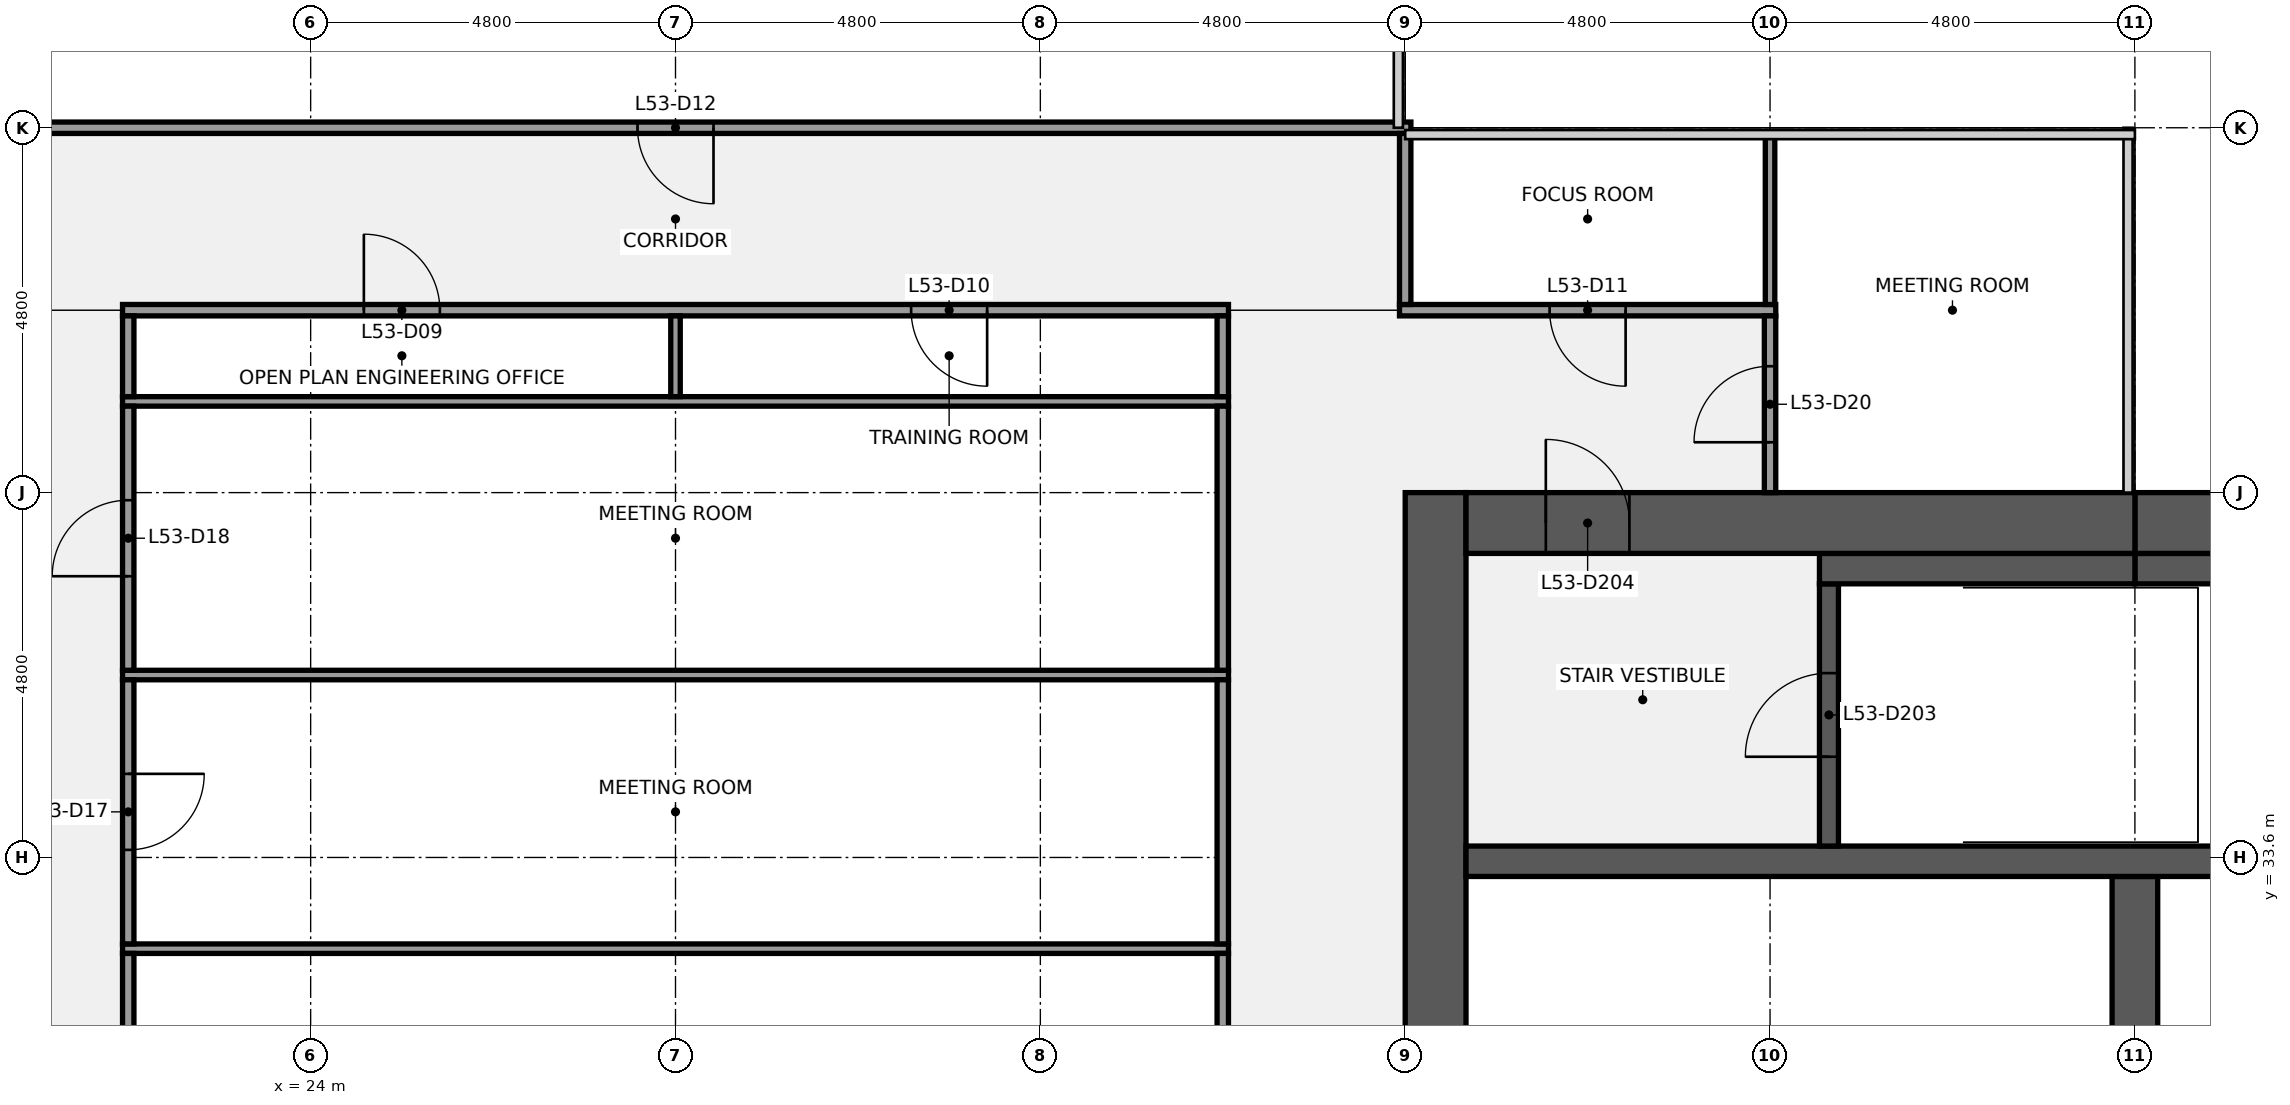
"""IFC4 building model, lengths in metres.
Left out: names, types, materials, properties, quantities, classifications, styles, units other than length and angle.
Written with IfcOpenShell. Run it as: python <this file> out.ifc"""

import sys

from ifc_helpers import new_model, si_unit, direction, frame, frame_2d, origin, place, context, subcontext, project, spatial, rectangle, extrude, element, fill, save


model = new_model("IFC4")
c1 = context("Model", 3, precision=1e-05, world=origin(), true_north=direction((0.0, 1.0)))
c2 = subcontext(c1, "Body", "Model", "MODEL_VIEW")
j1 = project(units=[si_unit("LENGTHUNIT", "METRE"), si_unit("PLANEANGLEUNIT", "RADIAN")], contexts=[c1])
p1 = place(None, origin())
s1 = spatial("IfcSite", under=j1, at=p1, CompositionType="ELEMENT")
p2 = place(p1, origin())
s2 = spatial("IfcBuilding", under=s1, at=p2, CompositionType="ELEMENT")
p3 = place(p2, frame((0.0, 0.0, 241.2)))
s3 = spatial("IfcBuildingStorey", under=s2, at=p3, CompositionType="ELEMENT", Elevation=241.2)
p4 = place(p3, frame((38.8, 9.6, 0.0), z_axis=(0.0, 0.0, 1.0), x_axis=(0.0, 1.0, 0.0)))
e1 = element("IfcWall", 1, at=p4, inside=s3, PredefinedType="SHEAR", context=c2, shape_type="SweptSolid", body=[
    extrude(rectangle(XDim=28.8, YDim=0.8, at=frame_2d((14.4, 0.0))), origin(), (0.0, 0.0, 1.0), 3.84),
])
p5 = place(p4, frame((8.7, 0.0, 0.0)))
e2 = element("IfcOpeningElement", 2, at=p5, cuts=e1, PredefinedType="OPENING", context=c2, shape_type="SweptSolid", body=[
    extrude(rectangle(XDim=1.8, YDim=2.1, at=frame_2d((0.9, 1.05))), frame((0.0, 0.41, 0.0), z_axis=(0.0, -1.0, 0.0), x_axis=(1.0, 0.0, 0.0)), (0.0, 0.0, 1.0), 0.82),
])
p6 = place(p4, frame((18.3, 0.0, 0.0)))
e3 = element("IfcOpeningElement", 3, at=p6, cuts=e1, PredefinedType="OPENING", context=c2, shape_type="SweptSolid", body=[
    extrude(rectangle(XDim=1.8, YDim=2.1, at=frame_2d((0.9, 1.05))), frame((0.0, 0.41, 0.0), z_axis=(0.0, -1.0, 0.0), x_axis=(1.0, 0.0, 0.0)), (0.0, 0.0, 1.0), 0.82),
])
p7 = place(p3, frame((48.0, 30.75, 0.0), z_axis=(0.0, 0.0, 1.0), x_axis=(0.0, 1.0, 0.0)))
e4 = element("IfcWall", 4, at=p7, inside=s3, PredefinedType="SHEAR", context=c2, shape_type="SweptSolid", body=[
    extrude(rectangle(XDim=2.6, YDim=0.6, at=frame_2d((1.3, 0.0))), origin(), (0.0, 0.0, 1.0), 3.84),
])
p8 = place(p3, frame((39.2, 33.55, 0.0), z_axis=(0.0, 0.0, 1.0), x_axis=(1.0, 0.0, 0.0)))
e5 = element("IfcWall", 5, at=p8, inside=s3, PredefinedType="SHEAR", context=c2, shape_type="SweptSolid", body=[
    extrude(rectangle(XDim=17.6, YDim=0.4, at=frame_2d((8.8, 0.0))), origin(), (0.0, 0.0, 1.0), 3.84),
])
p9 = place(p3, frame((43.975, 33.75, 0.0), z_axis=(0.0, 0.0, 1.0), x_axis=(0.0, 1.0, 0.0)))
e6 = element("IfcWall", 6, at=p9, inside=s3, PredefinedType="SHEAR", context=c2, shape_type="SweptSolid", body=[
    extrude(rectangle(XDim=3.45, YDim=0.25, at=frame_2d((1.725, 0.0))), origin(), (0.0, 0.0, 1.0), 3.84),
])
p10 = place(p9, frame((1.175, 0.0, 0.0)))
e7 = element("IfcOpeningElement", 7, at=p10, cuts=e6, PredefinedType="OPENING", context=c2, shape_type="SweptSolid", body=[
    extrude(rectangle(XDim=1.1, YDim=2.1, at=frame_2d((0.55, 1.05))), frame((0.0, 0.135, 0.0), z_axis=(0.0, -1.0, 0.0), x_axis=(1.0, 0.0, 0.0)), (0.0, 0.0, 1.0), 0.27),
])
p11 = place(p3, frame((48.0, 37.4, 0.0), z_axis=(0.0, 0.0, 1.0), x_axis=(1.0, 0.0, 0.0)))
e8 = element("IfcWall", 8, at=p11, inside=s3, PredefinedType="SHEAR", context=c2, shape_type="SweptSolid", body=[
    extrude(rectangle(XDim=3.35, YDim=0.4, at=frame_2d((1.675, 0.0))), origin(), (0.0, 0.0, 1.0), 3.84),
])
p12 = place(p3, frame((43.85, 37.4, 0.0), z_axis=(0.0, 0.0, 1.0), x_axis=(1.0, 0.0, 0.0)))
e9 = element("IfcWall", 9, at=p12, inside=s3, PredefinedType="SHEAR", context=c2, shape_type="SweptSolid", body=[
    extrude(rectangle(XDim=4.15, YDim=0.4, at=frame_2d((2.075, 0.0))), origin(), (0.0, 0.0, 1.0), 3.84),
])
p13 = place(p3, frame((48.0, 38.0, 0.0), z_axis=(0.0, 0.0, 1.0), x_axis=(1.0, 0.0, 0.0)))
e10 = element("IfcWall", 10, at=p13, inside=s3, PredefinedType="SHEAR", context=c2, shape_type="SweptSolid", body=[
    extrude(rectangle(XDim=8.8, YDim=0.8, at=frame_2d((4.4, 0.0))), origin(), (0.0, 0.0, 1.0), 3.84),
])
p14 = place(p13, frame((1.5, 0.0, 0.9)))
e11 = element("IfcOpeningElement", 11, at=p14, cuts=e10, PredefinedType="OPENING", context=c2, shape_type="SweptSolid", body=[
    extrude(rectangle(XDim=1.8, YDim=1.5, at=frame_2d((0.9, 0.75))), frame((0.0, 0.41, 0.0), z_axis=(0.0, -1.0, 0.0), x_axis=(1.0, 0.0, 0.0)), (0.0, 0.0, 1.0), 0.82),
])
p15 = place(p3, frame((39.2, 38.0, 0.0), z_axis=(0.0, 0.0, 1.0), x_axis=(1.0, 0.0, 0.0)))
e12 = element("IfcWall", 12, at=p15, inside=s3, PredefinedType="SHEAR", context=c2, shape_type="SweptSolid", body=[
    extrude(rectangle(XDim=8.8, YDim=0.8, at=frame_2d((4.4, 0.0))), origin(), (0.0, 0.0, 1.0), 3.84),
])
p16 = place(p15, frame((1.05, 0.0, 0.0)))
e13 = element("IfcOpeningElement", 13, at=p16, cuts=e12, PredefinedType="OPENING", context=c2, shape_type="SweptSolid", body=[
    extrude(rectangle(XDim=1.1, YDim=2.1, at=frame_2d((0.55, 1.05))), frame((0.0, 0.41, 0.0), z_axis=(0.0, -1.0, 0.0), x_axis=(1.0, 0.0, 0.0)), (0.0, 0.0, 1.0), 0.82),
])
for number, where, z_axis, x_axis in (
    (14, (21.525, 32.4, 0.0), (0.0, 0.0, 1.0), (1.0, 0.0, 0.0)),
    (15, (21.525, 36.0, 0.0), (0.0, 0.0, 1.0), (1.0, 0.0, 0.0)),
    (16, (21.525, 39.6, 0.0), (0.0, 0.0, 1.0), (1.0, 0.0, 0.0)),
):
    element("IfcWall", number, at=place(p3, frame(where, z_axis=z_axis, x_axis=x_axis)), inside=s3, PredefinedType="PARTITIONING", context=c2, shape_type="SweptSolid", body=[
        extrude(rectangle(XDim=14.55, YDim=0.125, at=frame_2d((7.275, 0.0))), origin(), (0.0, 0.0, 1.0), 2.849),
    ])
p17 = place(p3, frame((21.525, 40.8, 0.0), z_axis=(0.0, 0.0, 1.0), x_axis=(1.0, 0.0, 0.0)))
e17 = element("IfcWall", 17, at=p17, inside=s3, PredefinedType="PARTITIONING", context=c2, shape_type="SweptSolid", body=[
    extrude(rectangle(XDim=14.55, YDim=0.15, at=frame_2d((7.275, 0.0))), origin(), (0.0, 0.0, 1.0), 2.849),
])
p18 = place(p17, frame((3.175, 0.0, 0.0)))
e18 = element("IfcOpeningElement", 18, at=p18, cuts=e17, PredefinedType="OPENING", context=c2, shape_type="SweptSolid", body=[
    extrude(rectangle(XDim=1.0, YDim=2.1, at=frame_2d((0.5, 1.05))), frame((0.0, 0.085, 0.0), z_axis=(0.0, -1.0, 0.0), x_axis=(1.0, 0.0, 0.0)), (0.0, 0.0, 1.0), 0.17),
])
p19 = place(p17, frame((10.375, 0.0, 0.0)))
e19 = element("IfcOpeningElement", 19, at=p19, cuts=e17, PredefinedType="OPENING", context=c2, shape_type="SweptSolid", body=[
    extrude(rectangle(XDim=1.0, YDim=2.1, at=frame_2d((0.5, 1.05))), frame((0.0, 0.085, 0.0), z_axis=(0.0, -1.0, 0.0), x_axis=(1.0, 0.0, 0.0)), (0.0, 0.0, 1.0), 0.17),
])
p20 = place(p3, frame((38.325, 40.8, 0.0), z_axis=(0.0, 0.0, 1.0), x_axis=(1.0, 0.0, 0.0)))
e20 = element("IfcWall", 20, at=p20, inside=s3, PredefinedType="PARTITIONING", context=c2, shape_type="SweptSolid", body=[
    extrude(rectangle(XDim=4.95, YDim=0.15, at=frame_2d((2.475, 0.0))), origin(), (0.0, 0.0, 1.0), 2.849),
])
p21 = place(p20, frame((1.975, 0.0, 0.0)))
e21 = element("IfcOpeningElement", 21, at=p21, cuts=e20, PredefinedType="OPENING", context=c2, shape_type="SweptSolid", body=[
    extrude(rectangle(XDim=1.0, YDim=2.1, at=frame_2d((0.5, 1.05))), frame((0.0, 0.085, 0.0), z_axis=(0.0, -1.0, 0.0), x_axis=(1.0, 0.0, 0.0)), (0.0, 0.0, 1.0), 0.17),
])
p22 = place(p3, frame((19.125, 43.2, 0.0), z_axis=(0.0, 0.0, 1.0), x_axis=(1.0, 0.0, 0.0)))
e22 = element("IfcWall", 22, at=p22, inside=s3, PredefinedType="PARTITIONING", context=c2, shape_type="SweptSolid", body=[
    extrude(rectangle(XDim=19.35, YDim=0.15, at=frame_2d((9.675, 0.0))), origin(), (0.0, 0.0, 1.0), 2.849),
])
p23 = place(p22, frame((9.175, 0.0, 0.0)))
e23 = element("IfcOpeningElement", 23, at=p23, cuts=e22, PredefinedType="OPENING", context=c2, shape_type="SweptSolid", body=[
    extrude(rectangle(XDim=1.0, YDim=2.1, at=frame_2d((0.5, 1.05))), frame((0.0, 0.085, 0.0), z_axis=(0.0, -1.0, 0.0), x_axis=(1.0, 0.0, 0.0)), (0.0, 0.0, 1.0), 0.17),
])
p24 = place(p3, frame((21.6, 22.863, 0.0), z_axis=(0.0, 0.0, 1.0), x_axis=(0.0, 1.0, 0.0)))
e24 = element("IfcWall", 24, at=p24, inside=s3, PredefinedType="PARTITIONING", context=c2, shape_type="SweptSolid", body=[
    extrude(rectangle(XDim=9.475, YDim=0.15, at=frame_2d((4.737, 0.0))), origin(), (0.0, 0.0, 1.0), 2.849),
])
p25 = place(p24, frame((4.238, 0.0, 0.0)))
e25 = element("IfcOpeningElement", 25, at=p25, cuts=e24, PredefinedType="OPENING", context=c2, shape_type="SweptSolid", body=[
    extrude(rectangle(XDim=1.0, YDim=2.1, at=frame_2d((0.5, 1.05))), frame((0.0, 0.085, 0.0), z_axis=(0.0, -1.0, 0.0), x_axis=(1.0, 0.0, 0.0)), (0.0, 0.0, 1.0), 0.17),
])
p26 = place(p3, frame((21.6, 32.462, 0.0), z_axis=(0.0, 0.0, 1.0), x_axis=(0.0, 1.0, 0.0)))
e26 = element("IfcWall", 26, at=p26, inside=s3, PredefinedType="PARTITIONING", context=c2, shape_type="SweptSolid", body=[
    extrude(rectangle(XDim=3.475, YDim=0.15, at=frame_2d((1.738, 0.0))), origin(), (0.0, 0.0, 1.0), 2.849),
])
p27 = place(p26, frame((1.238, 0.0, 0.0)))
e27 = element("IfcOpeningElement", 27, at=p27, cuts=e26, PredefinedType="OPENING", context=c2, shape_type="SweptSolid", body=[
    extrude(rectangle(XDim=1.0, YDim=2.1, at=frame_2d((0.5, 1.05))), frame((0.0, 0.085, 0.0), z_axis=(0.0, -1.0, 0.0), x_axis=(1.0, 0.0, 0.0)), (0.0, 0.0, 1.0), 0.17),
])
p28 = place(p3, frame((21.6, 36.062, 0.0), z_axis=(0.0, 0.0, 1.0), x_axis=(0.0, 1.0, 0.0)))
e28 = element("IfcWall", 28, at=p28, inside=s3, PredefinedType="PARTITIONING", context=c2, shape_type="SweptSolid", body=[
    extrude(rectangle(XDim=3.475, YDim=0.15, at=frame_2d((1.738, 0.0))), origin(), (0.0, 0.0, 1.0), 2.849),
])
p29 = place(p28, frame((1.238, 0.0, 0.0)))
e29 = element("IfcOpeningElement", 29, at=p29, cuts=e28, PredefinedType="OPENING", context=c2, shape_type="SweptSolid", body=[
    extrude(rectangle(XDim=1.0, YDim=2.1, at=frame_2d((0.5, 1.05))), frame((0.0, 0.085, 0.0), z_axis=(0.0, -1.0, 0.0), x_axis=(1.0, 0.0, 0.0)), (0.0, 0.0, 1.0), 0.17),
])
p30 = place(p3, frame((21.6, 39.663, 0.0), z_axis=(0.0, 0.0, 1.0), x_axis=(0.0, 1.0, 0.0)))
e30 = element("IfcWall", 30, at=p30, inside=s3, PredefinedType="PARTITIONING", context=c2, shape_type="SweptSolid", body=[
    extrude(rectangle(XDim=1.062, YDim=0.15, at=frame_2d((0.531, 0.0))), origin(), (0.0, 0.0, 1.0), 2.849),
])
p31 = place(p3, frame((28.8, 39.663, 0.0), z_axis=(0.0, 0.0, 1.0), x_axis=(0.0, 1.0, 0.0)))
e31 = element("IfcWall", 31, at=p31, inside=s3, PredefinedType="PARTITIONING", context=c2, shape_type="SweptSolid", body=[
    extrude(rectangle(XDim=1.062, YDim=0.125, at=frame_2d((0.531, 0.0))), origin(), (0.0, 0.0, 1.0), 2.849),
])
p32 = place(p3, frame((36.0, 22.863, 0.0), z_axis=(0.0, 0.0, 1.0), x_axis=(0.0, 1.0, 0.0)))
e32 = element("IfcWall", 32, at=p32, inside=s3, PredefinedType="PARTITIONING", context=c2, shape_type="SweptSolid", body=[
    extrude(rectangle(XDim=9.475, YDim=0.15, at=frame_2d((4.737, 0.0))), origin(), (0.0, 0.0, 1.0), 2.849),
])
for number, where, z_axis, x_axis in (
    (33, (36.0, 32.462, 0.0), (0.0, 0.0, 1.0), (0.0, 1.0, 0.0)),
    (34, (36.0, 36.062, 0.0), (0.0, 0.0, 1.0), (0.0, 1.0, 0.0)),
):
    element("IfcWall", number, at=place(p3, frame(where, z_axis=z_axis, x_axis=x_axis)), inside=s3, PredefinedType="PARTITIONING", context=c2, shape_type="SweptSolid", body=[
        extrude(rectangle(XDim=3.475, YDim=0.15, at=frame_2d((1.738, 0.0))), origin(), (0.0, 0.0, 1.0), 2.849),
    ])
p33 = place(p3, frame((36.0, 39.663, 0.0), z_axis=(0.0, 0.0, 1.0), x_axis=(0.0, 1.0, 0.0)))
e35 = element("IfcWall", 35, at=p33, inside=s3, PredefinedType="PARTITIONING", context=c2, shape_type="SweptSolid", body=[
    extrude(rectangle(XDim=1.062, YDim=0.15, at=frame_2d((0.531, 0.0))), origin(), (0.0, 0.0, 1.0), 2.849),
])
p34 = place(p3, frame((38.4, 40.875, 0.0), z_axis=(0.0, 0.0, 1.0), x_axis=(0.0, 1.0, 0.0)))
e36 = element("IfcWall", 36, at=p34, inside=s3, PredefinedType="PARTITIONING", context=c2, shape_type="SweptSolid", body=[
    extrude(rectangle(XDim=2.25, YDim=0.15, at=frame_2d((1.125, 0.0))), origin(), (0.0, 0.0, 1.0), 2.849),
])
p35 = place(p3, frame((43.2, 40.875, 0.0), z_axis=(0.0, 0.0, 1.0), x_axis=(0.0, 1.0, 0.0)))
e37 = element("IfcWall", 37, at=p35, inside=s3, PredefinedType="PARTITIONING", context=c2, shape_type="SweptSolid", body=[
    extrude(rectangle(XDim=2.225, YDim=0.125, at=frame_2d((1.113, 0.0))), origin(), (0.0, 0.0, 1.0), 2.849),
])
p36 = place(p3, frame((43.2, 38.4, 0.0), z_axis=(0.0, 0.0, 1.0), x_axis=(0.0, 1.0, 0.0)))
e38 = element("IfcWall", 38, at=p36, inside=s3, PredefinedType="PARTITIONING", context=c2, shape_type="SweptSolid", body=[
    extrude(rectangle(XDim=2.325, YDim=0.15, at=frame_2d((1.163, 0.0))), origin(), (0.0, 0.0, 1.0), 2.849),
])
p37 = place(p36, frame((0.663, 0.0, 0.0)))
e39 = element("IfcOpeningElement", 39, at=p37, cuts=e38, PredefinedType="OPENING", context=c2, shape_type="SweptSolid", body=[
    extrude(rectangle(XDim=1.0, YDim=2.1, at=frame_2d((0.5, 1.05))), frame((0.0, 0.085, 0.0), z_axis=(0.0, -1.0, 0.0), x_axis=(1.0, 0.0, 0.0)), (0.0, 0.0, 1.0), 0.17),
])
p38 = place(p10, origin())
e40 = element("IfcDoor", 40, at=p38, inside=s3, OperationType="SINGLE_SWING_LEFT", PredefinedType="DOOR", context=c2, shape_type="SweptSolid", body=[
    extrude(rectangle(XDim=1.1, YDim=2.1, at=frame_2d((0.55, 1.05))), frame((0.0, 0.025, 0.0), z_axis=(0.0, -1.0, 0.0), x_axis=(1.0, 0.0, 0.0)), (0.0, 0.0, 1.0), 0.05),
])
fill(e7, e40)
p39 = place(p16, origin())
e41 = element("IfcDoor", 41, at=p39, inside=s3, OperationType="SINGLE_SWING_LEFT", PredefinedType="DOOR", context=c2, shape_type="SweptSolid", body=[
    extrude(rectangle(XDim=1.1, YDim=2.1, at=frame_2d((0.55, 1.05))), frame((0.0, 0.025, 0.0), z_axis=(0.0, -1.0, 0.0), x_axis=(1.0, 0.0, 0.0)), (0.0, 0.0, 1.0), 0.05),
])
fill(e13, e41)
p40 = place(p18, origin())
e42 = element("IfcDoor", 42, at=p40, inside=s3, OperationType="SINGLE_SWING_LEFT", PredefinedType="DOOR", context=c2, shape_type="SweptSolid", body=[
    extrude(rectangle(XDim=1.0, YDim=2.1, at=frame_2d((0.5, 1.05))), frame((0.0, 0.025, 0.0), z_axis=(0.0, -1.0, 0.0), x_axis=(1.0, 0.0, 0.0)), (0.0, 0.0, 1.0), 0.05),
])
fill(e18, e42)
p41 = place(p19, origin())
e43 = element("IfcDoor", 43, at=p41, inside=s3, OperationType="SINGLE_SWING_RIGHT", PredefinedType="DOOR", context=c2, shape_type="SweptSolid", body=[
    extrude(rectangle(XDim=1.0, YDim=2.1, at=frame_2d((0.5, 1.05))), frame((0.0, 0.025, 0.0), z_axis=(0.0, -1.0, 0.0), x_axis=(1.0, 0.0, 0.0)), (0.0, 0.0, 1.0), 0.05),
])
fill(e19, e43)
p42 = place(p21, origin())
e44 = element("IfcDoor", 44, at=p42, inside=s3, OperationType="SINGLE_SWING_RIGHT", PredefinedType="DOOR", context=c2, shape_type="SweptSolid", body=[
    extrude(rectangle(XDim=1.0, YDim=2.1, at=frame_2d((0.5, 1.05))), frame((0.0, 0.025, 0.0), z_axis=(0.0, -1.0, 0.0), x_axis=(1.0, 0.0, 0.0)), (0.0, 0.0, 1.0), 0.05),
])
fill(e21, e44)
p43 = place(p23, origin())
e45 = element("IfcDoor", 45, at=p43, inside=s3, OperationType="SINGLE_SWING_RIGHT", PredefinedType="DOOR", context=c2, shape_type="SweptSolid", body=[
    extrude(rectangle(XDim=1.0, YDim=2.1, at=frame_2d((0.5, 1.05))), frame((0.0, 0.025, 0.0), z_axis=(0.0, -1.0, 0.0), x_axis=(1.0, 0.0, 0.0)), (0.0, 0.0, 1.0), 0.05),
])
fill(e23, e45)
p44 = place(p27, origin())
e46 = element("IfcDoor", 46, at=p44, inside=s3, OperationType="SINGLE_SWING_RIGHT", PredefinedType="DOOR", context=c2, shape_type="SweptSolid", body=[
    extrude(rectangle(XDim=1.0, YDim=2.1, at=frame_2d((0.5, 1.05))), frame((0.0, 0.025, 0.0), z_axis=(0.0, -1.0, 0.0), x_axis=(1.0, 0.0, 0.0)), (0.0, 0.0, 1.0), 0.05),
])
fill(e27, e46)
p45 = place(p29, origin())
e47 = element("IfcDoor", 47, at=p45, inside=s3, OperationType="SINGLE_SWING_LEFT", PredefinedType="DOOR", context=c2, shape_type="SweptSolid", body=[
    extrude(rectangle(XDim=1.0, YDim=2.1, at=frame_2d((0.5, 1.05))), frame((0.0, 0.025, 0.0), z_axis=(0.0, -1.0, 0.0), x_axis=(1.0, 0.0, 0.0)), (0.0, 0.0, 1.0), 0.05),
])
fill(e29, e47)
p46 = place(p37, origin())
e48 = element("IfcDoor", 48, at=p46, inside=s3, OperationType="SINGLE_SWING_LEFT", PredefinedType="DOOR", context=c2, shape_type="SweptSolid", body=[
    extrude(rectangle(XDim=1.0, YDim=2.1, at=frame_2d((0.5, 1.05))), frame((0.0, 0.025, 0.0), z_axis=(0.0, -1.0, 0.0), x_axis=(1.0, 0.0, 0.0)), (0.0, 0.0, 1.0), 0.05),
])
fill(e39, e48)
save(model, sys.argv[1])
